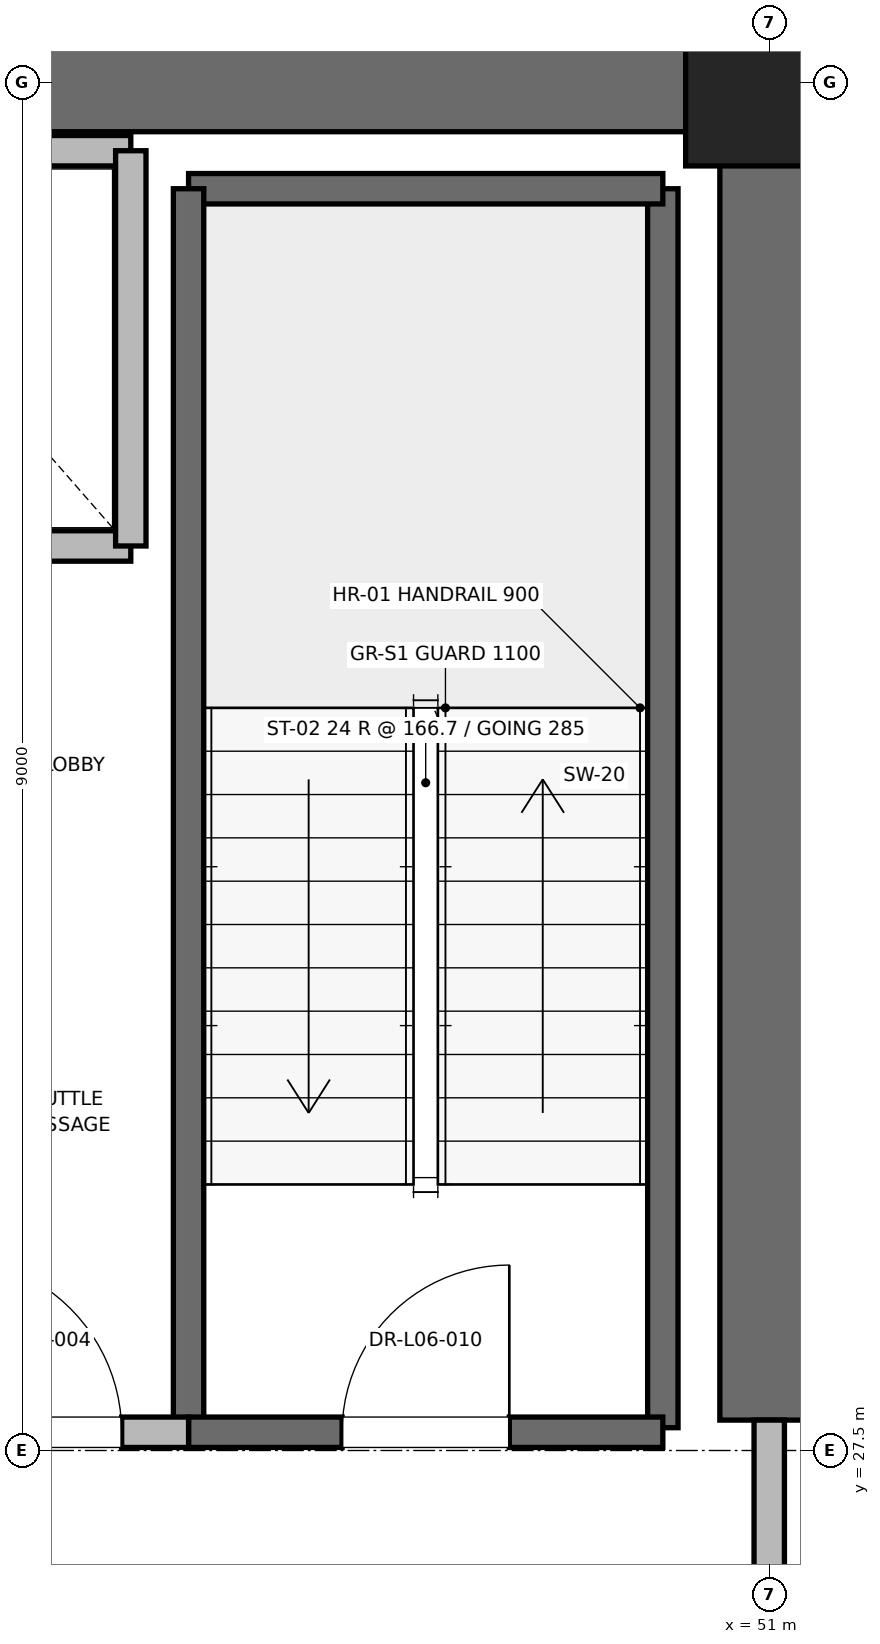
"""IFC4 building model, lengths in metres.
Left out: names, types, materials, properties, quantities, classifications, styles, units other than length and angle.
Written with IfcOpenShell. Run it as: python <this file> out.ifc"""

import sys

from ifc_helpers import new_model, si_unit, direction, frame, frame_2d, origin, origin_2d, place, context, subcontext, project, spatial, rectangle, extrude, element, fill, save


model = new_model("IFC4")
c1 = context("Model", 3, precision=1e-05, world=origin(), true_north=direction((0.0, 1.0)))
c2 = subcontext(c1, "Body", "Model", "MODEL_VIEW")
j1 = project(units=[si_unit("LENGTHUNIT", "METRE"), si_unit("PLANEANGLEUNIT", "RADIAN")], contexts=[c1])
p1 = place(None, origin())
s1 = spatial("IfcSite", under=j1, at=p1, CompositionType="ELEMENT")
p2 = place(p1, origin())
s2 = spatial("IfcBuilding", under=s1, at=p2, CompositionType="ELEMENT")
p3 = place(p2, frame((0.0, 0.0, 31.6)))
s3 = spatial("IfcBuildingStorey", under=s2, at=p3, CompositionType="ELEMENT", Elevation=31.6)
p4 = place(p3, frame((51.0, 36.5, 0.0), z_axis=(0.0, 0.0, 1.0), x_axis=(1.0, 0.0, 0.0)))
e1 = element("IfcColumn", 1, at=p4, inside=s3, PredefinedType="PILASTER", context=c2, shape_type="SweptSolid", body=[
    extrude(rectangle(XDim=1.1, YDim=1.1, at=origin_2d()), origin(), (0.0, 0.0, 1.0), 4.0),
])
p5 = place(p3, frame((45.2, 36.5, 0.0), z_axis=(0.0, 0.0, 1.0), x_axis=(1.0, 0.0, 0.0)))
e2 = element("IfcWall", 2, at=p5, inside=s3, PredefinedType="SHEAR", context=c2, shape_type="SweptSolid", body=[
    extrude(rectangle(XDim=5.8, YDim=0.65, at=frame_2d((2.9, 0.0))), origin(), (0.0, 0.0, 1.0), 3.76),
])
p6 = place(p3, frame((51.0, 27.7, 0.0), z_axis=(0.0, 0.0, 1.0), x_axis=(0.0, 1.0, 0.0)))
e3 = element("IfcWall", 3, at=p6, inside=s3, PredefinedType="SHEAR", context=c2, shape_type="SweptSolid", body=[
    extrude(rectangle(XDim=8.8, YDim=0.65, at=frame_2d((4.4, 0.0))), origin(), (0.0, 0.0, 1.0), 3.76),
])
p7 = place(p3, frame((50.3, 27.65, 0.0), z_axis=(0.0, 0.0, 1.0), x_axis=(0.0, 1.0, 0.0)))
e4 = element("IfcWall", 4, at=p7, inside=s3, PredefinedType="SOLIDWALL", context=c2, shape_type="SweptSolid", body=[
    extrude(rectangle(XDim=8.15, YDim=0.2, at=frame_2d((4.075, 0.0))), origin(), (0.0, 0.0, 1.0), 3.76),
])
p8 = place(p3, frame((47.18, 35.8, 0.0), z_axis=(0.0, 0.0, 1.0), x_axis=(1.0, 0.0, 0.0)))
e5 = element("IfcWall", 5, at=p8, inside=s3, PredefinedType="SOLIDWALL", context=c2, shape_type="SweptSolid", body=[
    extrude(rectangle(XDim=3.12, YDim=0.2, at=frame_2d((1.56, 0.0))), origin(), (0.0, 0.0, 1.0), 3.76),
])
p9 = place(p3, frame((47.18, 27.62, 0.0), z_axis=(0.0, 0.0, 1.0), x_axis=(0.0, 1.0, 0.0)))
e6 = element("IfcWall", 6, at=p9, inside=s3, PredefinedType="SOLIDWALL", context=c2, shape_type="SweptSolid", body=[
    extrude(rectangle(XDim=8.18, YDim=0.2, at=frame_2d((4.09, 0.0))), origin(), (0.0, 0.0, 1.0), 3.76),
])
p10 = place(p3, frame((47.18, 27.62, 0.0), z_axis=(0.0, 0.0, 1.0), x_axis=(1.0, 0.0, 0.0)))
e7 = element("IfcWall", 7, at=p10, inside=s3, PredefinedType="SOLIDWALL", context=c2, shape_type="SweptSolid", body=[
    extrude(rectangle(XDim=3.12, YDim=0.2, at=frame_2d((1.56, 0.0))), origin(), (0.0, 0.0, 1.0), 3.76),
])
p11 = place(p10, frame((1.01, 0.0, 0.0)))
e8 = element("IfcOpeningElement", 8, at=p11, cuts=e7, PredefinedType="OPENING", context=c2, shape_type="SweptSolid", body=[
    extrude(rectangle(XDim=1.1, YDim=2.15, at=frame_2d((0.55, 1.075))), frame((0.0, 0.1, 0.0), z_axis=(0.0, -1.0, 0.0), x_axis=(1.0, 0.0, 0.0)), (0.0, 0.0, 1.0), 0.2),
])
p12 = place(p3, frame((45.15, 27.62, 0.0), z_axis=(0.0, 0.0, 1.0), x_axis=(1.0, 0.0, 0.0)))
e9 = element("IfcWall", 9, at=p12, inside=s3, PredefinedType="PARTITIONING", context=c2, shape_type="SweptSolid", body=[
    extrude(rectangle(XDim=2.03, YDim=0.2, at=frame_2d((1.015, 0.0))), origin(), (0.0, 0.0, 1.0), 3.76),
])
p13 = place(p12, frame((0.44, 0.0, 0.0)))
e10 = element("IfcOpeningElement", 10, at=p13, cuts=e9, PredefinedType="OPENING", context=c2, shape_type="SweptSolid", body=[
    extrude(rectangle(XDim=1.15, YDim=2.2, at=frame_2d((0.575, 1.1))), frame((0.0, 0.1, 0.0), z_axis=(0.0, -1.0, 0.0), x_axis=(1.0, 0.0, 0.0)), (0.0, 0.0, 1.0), 0.2),
])
p14 = place(p3, frame((51.0, 24.3, 0.0), z_axis=(0.0, 0.0, 1.0), x_axis=(0.0, 1.0, 0.0)))
e11 = element("IfcWall", 11, at=p14, inside=s3, PredefinedType="PARTITIONING", context=c2, shape_type="SweptSolid", body=[
    extrude(rectangle(XDim=3.4, YDim=0.2, at=frame_2d((1.7, 0.0))), origin(), (0.0, 0.0, 1.0), 2.54),
])
p15 = place(p14, frame((1.125, 0.0, 0.0)))
e12 = element("IfcOpeningElement", 12, at=p15, cuts=e11, PredefinedType="OPENING", context=c2, shape_type="SweptSolid", body=[
    extrude(rectangle(XDim=1.15, YDim=2.2, at=frame_2d((0.575, 1.1))), frame((0.0, 0.1, 0.0), z_axis=(0.0, -1.0, 0.0), x_axis=(1.0, 0.0, 0.0)), (0.0, 0.0, 1.0), 0.2),
])
p16 = place(p3, frame((44.5, 33.45, 0.0), z_axis=(0.0, 0.0, 1.0), x_axis=(1.0, 0.0, 0.0)))
e13 = element("IfcWall", 13, at=p16, inside=s3, PredefinedType="SOLIDWALL", context=c2, shape_type="SweptSolid", body=[
    extrude(rectangle(XDim=2.3, YDim=0.2, at=frame_2d((1.15, 0.0))), origin(), (0.0, 0.0, 1.0), 3.76),
])
p17 = place(p3, frame((46.8, 36.05, 0.0), z_axis=(0.0, 0.0, 1.0), x_axis=(-1.0, 0.0, 0.0)))
e14 = element("IfcWall", 14, at=p17, inside=s3, PredefinedType="SOLIDWALL", context=c2, shape_type="SweptSolid", body=[
    extrude(rectangle(XDim=2.3, YDim=0.2, at=frame_2d((1.15, 0.0))), origin(), (0.0, 0.0, 1.0), 2.54),
])
p18 = place(p3, frame((46.8, 33.45, 0.0), z_axis=(0.0, 0.0, 1.0), x_axis=(0.0, 1.0, 0.0)))
e15 = element("IfcWall", 15, at=p18, inside=s3, PredefinedType="SOLIDWALL", context=c2, shape_type="SweptSolid", body=[
    extrude(rectangle(XDim=2.6, YDim=0.2, at=frame_2d((1.3, 0.0))), origin(), (0.0, 0.0, 1.0), 3.76),
])
p19 = place(p11, origin())
e16 = element("IfcDoor", 16, at=p19, inside=s3, OperationType="SINGLE_SWING_RIGHT", PredefinedType="DOOR", context=c2, shape_type="SweptSolid", body=[
    extrude(rectangle(XDim=1.1, YDim=2.15, at=frame_2d((0.55, 1.075))), frame((0.0, 0.025, 0.0), z_axis=(0.0, -1.0, 0.0), x_axis=(1.0, 0.0, 0.0)), (0.0, 0.0, 1.0), 0.05),
])
fill(e8, e16)
p20 = place(p13, origin())
e17 = element("IfcDoor", 17, at=p20, inside=s3, OperationType="SINGLE_SWING_LEFT", PredefinedType="DOOR", context=c2, shape_type="SweptSolid", body=[
    extrude(rectangle(XDim=1.15, YDim=2.2, at=frame_2d((0.575, 1.1))), frame((0.0, 0.025, 0.0), z_axis=(0.0, -1.0, 0.0), x_axis=(1.0, 0.0, 0.0)), (0.0, 0.0, 1.0), 0.05),
])
fill(e10, e17)
save(model, sys.argv[1])
